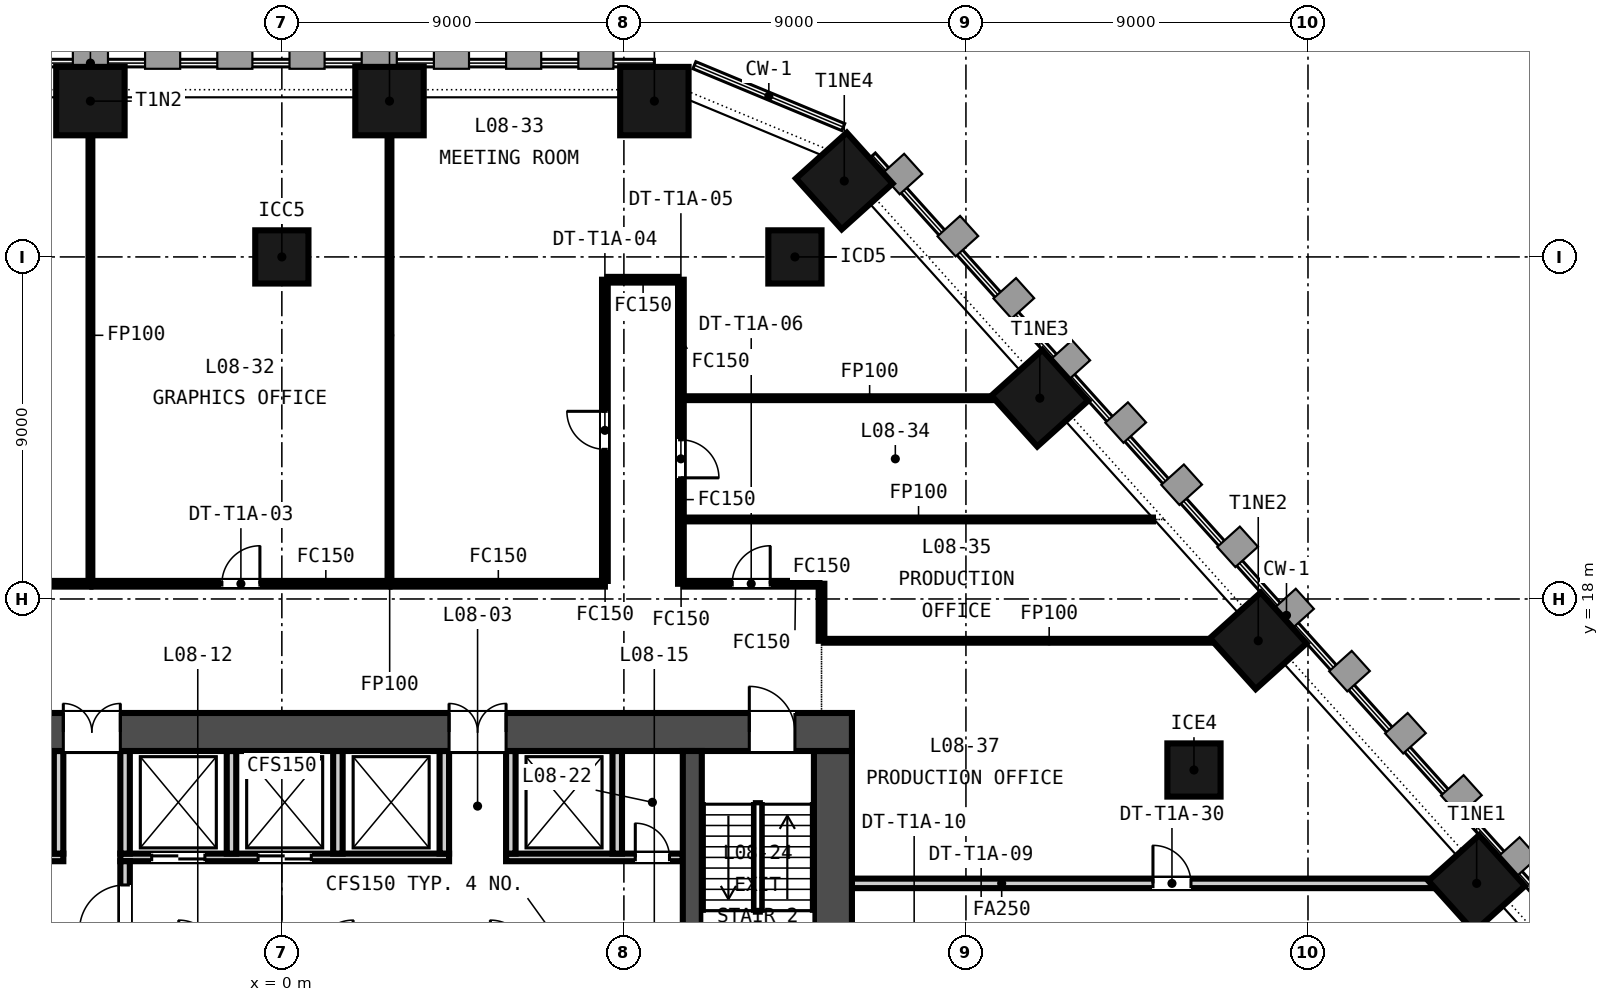
"""IFC4 building model, lengths in metres.
Left out: names, types, materials, properties, quantities, classifications, styles, units other than length and angle.
Written with IfcOpenShell. Run it as: python <this file> out.ifc"""

import sys

from ifc_helpers import new_model, si_unit, direction, frame, frame_2d, origin, origin_2d, place, context, subcontext, project, spatial, rectangle, extrude, element, fill, save


model = new_model("IFC4")
c1 = context("Model", 3, precision=1e-05, world=origin(), true_north=direction((0.0, 1.0)))
c2 = subcontext(c1, "Body", "Model", "MODEL_VIEW")
j1 = project(units=[si_unit("LENGTHUNIT", "METRE"), si_unit("PLANEANGLEUNIT", "RADIAN")], contexts=[c1])
p1 = place(None, origin())
s1 = spatial("IfcSite", under=j1, at=p1, CompositionType="ELEMENT")
p2 = place(p1, origin())
s2 = spatial("IfcBuilding", under=s1, at=p2, CompositionType="ELEMENT")
p3 = place(p2, frame((0.0, 0.0, 43.3)))
s3 = spatial("IfcBuildingStorey", under=s2, at=p3, CompositionType="ELEMENT", Elevation=43.3)
p4 = place(p3, frame((-15.0, 14.5, -0.15), z_axis=(0.0, 0.0, 1.0), x_axis=(1.0, 0.0, 0.0)))
e1 = element("IfcWall", 1, at=p4, inside=s3, PredefinedType="SOLIDWALL", context=c2, shape_type="SweptSolid", body=[
    extrude(rectangle(XDim=30.0, YDim=1.0, at=frame_2d((15.0, 0.0))), origin(), (0.0, 0.0, 1.0), 3.65),
])
p5 = place(p4, frame((9.25, 0.0, 0.15)))
e2 = element("IfcOpeningElement", 2, at=p5, cuts=e1, PredefinedType="OPENING", context=c2, shape_type="SweptSolid", body=[
    extrude(rectangle(XDim=1.5, YDim=2.1, at=frame_2d((0.75, 1.05))), frame((0.0, 0.51, 0.0), z_axis=(0.0, -1.0, 0.0), x_axis=(1.0, 0.0, 0.0)), (0.0, 0.0, 1.0), 1.02),
])
p6 = place(p4, frame((19.4, 0.0, 0.15)))
e3 = element("IfcOpeningElement", 3, at=p6, cuts=e1, PredefinedType="OPENING", context=c2, shape_type="SweptSolid", body=[
    extrude(rectangle(XDim=1.5, YDim=2.1, at=frame_2d((0.75, 1.05))), frame((0.0, 0.51, 0.0), z_axis=(0.0, -1.0, 0.0), x_axis=(1.0, 0.0, 0.0)), (0.0, 0.0, 1.0), 1.02),
])
p7 = place(p4, frame((1.5, 0.0, 0.15)))
e4 = element("IfcOpeningElement", 4, at=p7, cuts=e1, PredefinedType="OPENING", context=c2, shape_type="SweptSolid", body=[
    extrude(rectangle(XDim=1.2, YDim=2.1, at=frame_2d((0.6, 1.05))), frame((0.0, 0.51, 0.0), z_axis=(0.0, -1.0, 0.0), x_axis=(1.0, 0.0, 0.0)), (0.0, 0.0, 1.0), 1.02),
])
p8 = place(p4, frame((27.3, 0.0, 0.15)))
e5 = element("IfcOpeningElement", 5, at=p8, cuts=e1, PredefinedType="OPENING", context=c2, shape_type="SweptSolid", body=[
    extrude(rectangle(XDim=1.2, YDim=2.1, at=frame_2d((0.6, 1.05))), frame((0.0, 0.51, 0.0), z_axis=(0.0, -1.0, 0.0), x_axis=(1.0, 0.0, 0.0)), (0.0, 0.0, 1.0), 1.02),
])
p9 = place(p3, frame((14.5, 1.0, -0.15), z_axis=(0.0, 0.0, 1.0), x_axis=(0.0, 1.0, 0.0)))
e6 = element("IfcWall", 6, at=p9, inside=s3, PredefinedType="SOLIDWALL", context=c2, shape_type="SweptSolid", body=[
    extrude(rectangle(XDim=13.0, YDim=1.0, at=frame_2d((6.5, 0.0))), origin(), (0.0, 0.0, 1.0), 3.65),
])
p10 = place(p3, frame((10.8, 1.0, -0.15), z_axis=(0.0, 0.0, 1.0), x_axis=(0.0, 1.0, 0.0)))
e7 = element("IfcWall", 7, at=p10, inside=s3, PredefinedType="SOLIDWALL", context=c2, shape_type="SweptSolid", body=[
    extrude(rectangle(XDim=13.0, YDim=0.5, at=frame_2d((6.5, 0.0))), origin(), (0.0, 0.0, 1.0), 3.65),
])
for number, where, z_axis, x_axis in (
    (8, (9.802, 31.1, -0.15), (0.0, 0.0, 1.0), (-1.0, 0.0, 0.0)),
    (9, (2.832, 31.1, -0.15), (0.0, 0.0, 1.0), (-1.0, 0.0, 0.0)),
    (10, (-5.037, 31.1, -0.15), (0.0, 0.0, 1.0), (-1.0, 0.0, 0.0)),
    (11, (31.438, 10.517, -0.15), (0.0, 0.0, 1.0), (-0.669, 0.743, 0.0)),
    (12, (25.691, 16.9, -0.15), (0.0, 0.0, 1.0), (-0.669, 0.743, 0.0)),
    (13, (19.944, 23.283, -0.15), (0.0, 0.0, 1.0), (-0.669, 0.743, 0.0)),
    (14, (14.799, 28.998, -0.15), (0.0, 0.0, 1.0), (-0.669, 0.743, 0.0)),
):
    element("IfcColumn", number, at=place(p3, frame(where, z_axis=z_axis, x_axis=x_axis)), inside=s3, PredefinedType="COLUMN", context=c2, shape_type="SweptSolid", body=[
        extrude(rectangle(XDim=1.8, YDim=1.8, at=origin_2d()), origin(), (0.0, 0.0, 1.0), 3.65),
    ])
for number, where, z_axis, x_axis in (
    (15, (0.0, 27.0, -0.15), (0.0, 0.0, 1.0), (1.0, 0.0, 0.0)),
    (16, (13.5, 27.0, -0.15), (0.0, 0.0, 1.0), (1.0, 0.0, 0.0)),
    (17, (24.0, 13.5, -0.15), (0.0, 0.0, 1.0), (1.0, 0.0, 0.0)),
):
    element("IfcColumn", number, at=place(p3, frame(where, z_axis=z_axis, x_axis=x_axis)), inside=s3, PredefinedType="COLUMN", context=c2, shape_type="SweptSolid", body=[
        extrude(rectangle(XDim=1.4, YDim=1.4, at=origin_2d()), origin(), (0.0, 0.0, 1.0), 3.65),
    ])
p11 = place(p3, frame((-10.55, 11.2, 0.0), z_axis=(0.0, 0.0, 1.0), x_axis=(1.0, 0.0, 0.0)))
e18 = element("IfcWall", 18, at=p11, inside=s3, PredefinedType="PARTITIONING", context=c2, shape_type="SweptSolid", body=[
    extrude(rectangle(XDim=4.8, YDim=0.2, at=frame_2d((2.4, 0.0))), origin(), (0.0, 0.0, 1.0), 3.5),
])
p12 = place(p11, frame((0.525, 0.0, 0.0)))
e19 = element("IfcOpeningElement", 19, at=p12, cuts=e18, PredefinedType="OPENING", context=c2, shape_type="SweptSolid", body=[
    extrude(rectangle(XDim=1.1, YDim=2.1, at=frame_2d((0.55, 1.05))), frame((0.0, 0.11, 0.0), z_axis=(0.0, -1.0, 0.0), x_axis=(1.0, 0.0, 0.0)), (0.0, 0.0, 1.0), 0.22),
])
p13 = place(p11, frame((2.925, 0.0, 0.0)))
e20 = element("IfcOpeningElement", 20, at=p13, cuts=e18, PredefinedType="OPENING", context=c2, shape_type="SweptSolid", body=[
    extrude(rectangle(XDim=1.1, YDim=2.1, at=frame_2d((0.55, 1.05))), frame((0.0, 0.11, 0.0), z_axis=(0.0, -1.0, 0.0), x_axis=(1.0, 0.0, 0.0)), (0.0, 0.0, 1.0), 0.22),
])
p14 = place(p3, frame((-4.25, 11.2, 0.0), z_axis=(0.0, 0.0, 1.0), x_axis=(1.0, 0.0, 0.0)))
e21 = element("IfcWall", 21, at=p14, inside=s3, PredefinedType="PARTITIONING", context=c2, shape_type="SweptSolid", body=[
    extrude(rectangle(XDim=8.65, YDim=0.2, at=frame_2d((4.325, 0.0))), origin(), (0.0, 0.0, 1.0), 3.5),
])
p15 = place(p14, frame((0.825, 0.0, 0.0)))
e22 = element("IfcOpeningElement", 22, at=p15, cuts=e21, PredefinedType="OPENING", context=c2, shape_type="SweptSolid", body=[
    extrude(rectangle(XDim=1.4, YDim=2.1, at=frame_2d((0.7, 1.05))), frame((0.0, 0.11, 0.0), z_axis=(0.0, -1.0, 0.0), x_axis=(1.0, 0.0, 0.0)), (0.0, 0.0, 1.0), 0.22),
])
p16 = place(p14, frame((3.625, 0.0, 0.0)))
e23 = element("IfcOpeningElement", 23, at=p16, cuts=e21, PredefinedType="OPENING", context=c2, shape_type="SweptSolid", body=[
    extrude(rectangle(XDim=1.4, YDim=2.1, at=frame_2d((0.7, 1.05))), frame((0.0, 0.11, 0.0), z_axis=(0.0, -1.0, 0.0), x_axis=(1.0, 0.0, 0.0)), (0.0, 0.0, 1.0), 0.22),
])
p17 = place(p3, frame((5.9, 11.2, 0.0), z_axis=(0.0, 0.0, 1.0), x_axis=(1.0, 0.0, 0.0)))
e24 = element("IfcWall", 24, at=p17, inside=s3, PredefinedType="PARTITIONING", context=c2, shape_type="SweptSolid", body=[
    extrude(rectangle(XDim=4.65, YDim=0.2, at=frame_2d((2.325, 0.0))), origin(), (0.0, 0.0, 1.0), 3.5),
])
p18 = place(p17, frame((3.4, 0.0, 0.0)))
e25 = element("IfcOpeningElement", 25, at=p18, cuts=e24, PredefinedType="OPENING", context=c2, shape_type="SweptSolid", body=[
    extrude(rectangle(XDim=0.9, YDim=2.1, at=frame_2d((0.45, 1.05))), frame((0.0, 0.11, 0.0), z_axis=(0.0, -1.0, 0.0), x_axis=(1.0, 0.0, 0.0)), (0.0, 0.0, 1.0), 0.22),
])
p19 = place(p3, frame((-4.125, 6.15, 0.0), z_axis=(0.0, 0.0, 1.0), x_axis=(0.0, 1.0, 0.0)))
e26 = element("IfcWall", 26, at=p19, inside=s3, PredefinedType="PARTITIONING", context=c2, shape_type="SweptSolid", body=[
    extrude(rectangle(XDim=4.95, YDim=0.25, at=frame_2d((2.475, 0.0))), origin(), (0.0, 0.0, 1.0), 3.5),
])
p20 = place(p19, frame((3.125, 0.0, 0.0)))
e27 = element("IfcOpeningElement", 27, at=p20, cuts=e26, PredefinedType="OPENING", context=c2, shape_type="SweptSolid", body=[
    extrude(rectangle(XDim=1.2, YDim=2.1, at=frame_2d((0.6, 1.05))), frame((0.0, 0.135, 0.0), z_axis=(0.0, -1.0, 0.0), x_axis=(1.0, 0.0, 0.0)), (0.0, 0.0, 1.0), 0.27),
])
for number, where, z_axis, x_axis in (
    (28, (-5.875, 11.3, 0.0), (0.0, 0.0, 1.0), (0.0, 1.0, 0.0)),
    (29, (-4.125, 11.3, 0.0), (0.0, 0.0, 1.0), (0.0, 1.0, 0.0)),
    (30, (-1.325, 11.3, 0.0), (0.0, 0.0, 1.0), (0.0, 1.0, 0.0)),
    (31, (1.475, 11.3, 0.0), (0.0, 0.0, 1.0), (0.0, 1.0, 0.0)),
    (32, (4.275, 11.3, 0.0), (0.0, 0.0, 1.0), (0.0, 1.0, 0.0)),
    (33, (6.025, 11.3, 0.0), (0.0, 0.0, 1.0), (0.0, 1.0, 0.0)),
    (34, (8.825, 11.3, 0.0), (0.0, 0.0, 1.0), (0.0, 1.0, 0.0)),
):
    element("IfcWall", number, at=place(p3, frame(where, z_axis=z_axis, x_axis=x_axis)), inside=s3, PredefinedType="PARTITIONING", context=c2, shape_type="SweptSolid", body=[
        extrude(rectangle(XDim=2.7, YDim=0.25, at=frame_2d((1.35, 0.0))), origin(), (0.0, 0.0, 1.0), 3.5),
    ])
p21 = place(p3, frame((10.5, 26.4, 0.0), z_axis=(0.0, 0.0, 1.0), x_axis=(0.0, -1.0, 0.0)))
e35 = element("IfcWall", 35, at=p21, inside=s3, PredefinedType="PARTITIONING", context=c2, shape_type="SweptSolid", body=[
    extrude(rectangle(XDim=3.117, YDim=0.15, at=frame_2d((1.559, 0.0))), origin(), (0.0, 0.0, 1.0), 2.741),
])
p22 = place(p3, frame((10.5, 23.283, 0.0), z_axis=(0.0, 0.0, 1.0), x_axis=(0.0, -1.0, 0.0)))
e36 = element("IfcWall", 36, at=p22, inside=s3, PredefinedType="PARTITIONING", context=c2, shape_type="SweptSolid", body=[
    extrude(rectangle(XDim=3.191, YDim=0.15, at=frame_2d((1.595, 0.0))), origin(), (0.0, 0.0, 1.0), 2.741),
])
p23 = place(p22, frame((1.095, 0.0, 0.0)))
e37 = element("IfcOpeningElement", 37, at=p23, cuts=e36, PredefinedType="OPENING", context=c2, shape_type="SweptSolid", body=[
    extrude(rectangle(XDim=1.0, YDim=2.1, at=frame_2d((0.5, 1.05))), frame((0.0, 0.085, 0.0), z_axis=(0.0, -1.0, 0.0), x_axis=(1.0, 0.0, 0.0)), (0.0, 0.0, 1.0), 0.17),
])
p24 = place(p3, frame((10.5, 20.092, 0.0), z_axis=(0.0, 0.0, 1.0), x_axis=(0.0, -1.0, 0.0)))
e38 = element("IfcWall", 38, at=p24, inside=s3, PredefinedType="PARTITIONING", context=c2, shape_type="SweptSolid", body=[
    extrude(rectangle(XDim=1.692, YDim=0.15, at=frame_2d((0.846, 0.0))), origin(), (0.0, 0.0, 1.0), 2.741),
])
p25 = place(p3, frame((14.2, 18.4, 0.0), z_axis=(0.0, 0.0, 1.0), x_axis=(0.0, -1.0, 0.0)))
e39 = element("IfcWall", 39, at=p25, inside=s3, PredefinedType="PARTITIONING", context=c2, shape_type="SweptSolid", body=[
    extrude(rectangle(XDim=1.5, YDim=0.15, at=frame_2d((0.75, 0.0))), origin(), (0.0, 0.0, 1.0), 2.741),
])
p26 = place(p3, frame((-12.905, 18.4, 0.0), z_axis=(0.0, 0.0, 1.0), x_axis=(1.0, 0.0, 0.0)))
e40 = element("IfcWall", 40, at=p26, inside=s3, PredefinedType="PARTITIONING", context=c2, shape_type="SweptSolid", body=[
    extrude(rectangle(XDim=7.868, YDim=0.15, at=frame_2d((3.934, 0.0))), origin(), (0.0, 0.0, 1.0), 2.741),
])
p27 = place(p26, frame((3.434, 0.0, 0.0)))
e41 = element("IfcOpeningElement", 41, at=p27, cuts=e40, PredefinedType="OPENING", context=c2, shape_type="SweptSolid", body=[
    extrude(rectangle(XDim=1.0, YDim=2.1, at=frame_2d((0.5, 1.05))), frame((0.0, 0.085, 0.0), z_axis=(0.0, -1.0, 0.0), x_axis=(1.0, 0.0, 0.0)), (0.0, 0.0, 1.0), 0.17),
])
p28 = place(p3, frame((-5.037, 18.475, 0.0), z_axis=(0.0, 0.0, 1.0), x_axis=(0.0, 1.0, 0.0)))
e42 = element("IfcWall", 42, at=p28, inside=s3, PredefinedType="PARTITIONING", context=c2, shape_type="SweptSolid", body=[
    extrude(rectangle(XDim=12.925, YDim=0.1, at=frame_2d((6.462, 0.0))), origin(), (0.0, 0.0, 1.0), 2.741),
])
p29 = place(p3, frame((-4.987, 18.4, 0.0), z_axis=(0.0, 0.0, 1.0), x_axis=(1.0, 0.0, 0.0)))
e43 = element("IfcWall", 43, at=p29, inside=s3, PredefinedType="PARTITIONING", context=c2, shape_type="SweptSolid", body=[
    extrude(rectangle(XDim=7.819, YDim=0.15, at=frame_2d((3.91, 0.0))), origin(), (0.0, 0.0, 1.0), 2.741),
])
p30 = place(p29, frame((3.409, 0.0, 0.0)))
e44 = element("IfcOpeningElement", 44, at=p30, cuts=e43, PredefinedType="OPENING", context=c2, shape_type="SweptSolid", body=[
    extrude(rectangle(XDim=1.0, YDim=2.1, at=frame_2d((0.5, 1.05))), frame((0.0, 0.085, 0.0), z_axis=(0.0, -1.0, 0.0), x_axis=(1.0, 0.0, 0.0)), (0.0, 0.0, 1.0), 0.17),
])
p31 = place(p3, frame((2.832, 18.475, 0.0), z_axis=(0.0, 0.0, 1.0), x_axis=(0.0, 1.0, 0.0)))
e45 = element("IfcWall", 45, at=p31, inside=s3, PredefinedType="PARTITIONING", context=c2, shape_type="SweptSolid", body=[
    extrude(rectangle(XDim=12.925, YDim=0.1, at=frame_2d((6.462, 0.0))), origin(), (0.0, 0.0, 1.0), 2.741),
])
p32 = place(p3, frame((2.882, 18.4, 0.0), z_axis=(0.0, 0.0, 1.0), x_axis=(1.0, 0.0, 0.0)))
e46 = element("IfcWall", 46, at=p32, inside=s3, PredefinedType="PARTITIONING", context=c2, shape_type="SweptSolid", body=[
    extrude(rectangle(XDim=5.618, YDim=0.15, at=frame_2d((2.809, 0.0))), origin(), (0.0, 0.0, 1.0), 2.741),
])
p33 = place(p3, frame((8.5, 18.475, 0.0), z_axis=(0.0, 0.0, 1.0), x_axis=(0.0, 1.0, 0.0)))
e47 = element("IfcWall", 47, at=p33, inside=s3, PredefinedType="PARTITIONING", context=c2, shape_type="SweptSolid", body=[
    extrude(rectangle(XDim=7.925, YDim=0.15, at=frame_2d((3.962, 0.0))), origin(), (0.0, 0.0, 1.0), 2.741),
])
p34 = place(p33, frame((3.462, 0.0, 0.0)))
e48 = element("IfcOpeningElement", 48, at=p34, cuts=e47, PredefinedType="OPENING", context=c2, shape_type="SweptSolid", body=[
    extrude(rectangle(XDim=1.0, YDim=2.1, at=frame_2d((0.5, 1.05))), frame((0.0, 0.085, 0.0), z_axis=(0.0, -1.0, 0.0), x_axis=(1.0, 0.0, 0.0)), (0.0, 0.0, 1.0), 0.17),
])
p35 = place(p3, frame((8.575, 26.4, 0.0), z_axis=(0.0, 0.0, 1.0), x_axis=(1.0, 0.0, 0.0)))
e49 = element("IfcWall", 49, at=p35, inside=s3, PredefinedType="PARTITIONING", context=c2, shape_type="SweptSolid", body=[
    extrude(rectangle(XDim=1.85, YDim=0.15, at=frame_2d((0.925, 0.0))), origin(), (0.0, 0.0, 1.0), 2.741),
])
p36 = place(p3, frame((10.575, 23.283, 0.0), z_axis=(0.0, 0.0, 1.0), x_axis=(1.0, 0.0, 0.0)))
e50 = element("IfcWall", 50, at=p36, inside=s3, PredefinedType="PARTITIONING", context=c2, shape_type="SweptSolid", body=[
    extrude(rectangle(XDim=9.772, YDim=0.1, at=frame_2d((4.886, 0.0))), origin(), (0.0, 0.0, 1.0), 2.741),
])
p37 = place(p3, frame((10.575, 20.092, 0.0), z_axis=(0.0, 0.0, 1.0), x_axis=(1.0, 0.0, 0.0)))
e51 = element("IfcWall", 51, at=p37, inside=s3, PredefinedType="PARTITIONING", context=c2, shape_type="SweptSolid", body=[
    extrude(rectangle(XDim=12.346, YDim=0.1, at=frame_2d((6.173, 0.0))), origin(), (0.0, 0.0, 1.0), 2.741),
])
p38 = place(p3, frame((10.575, 18.4, 0.0), z_axis=(0.0, 0.0, 1.0), x_axis=(1.0, 0.0, 0.0)))
e52 = element("IfcWall", 52, at=p38, inside=s3, PredefinedType="PARTITIONING", context=c2, shape_type="SweptSolid", body=[
    extrude(rectangle(XDim=3.55, YDim=0.15, at=frame_2d((1.775, 0.0))), origin(), (0.0, 0.0, 1.0), 2.741),
])
p39 = place(p38, frame((1.275, 0.0, 0.0)))
e53 = element("IfcOpeningElement", 53, at=p39, cuts=e52, PredefinedType="OPENING", context=c2, shape_type="SweptSolid", body=[
    extrude(rectangle(XDim=1.0, YDim=2.1, at=frame_2d((0.5, 1.05))), frame((0.0, 0.085, 0.0), z_axis=(0.0, -1.0, 0.0), x_axis=(1.0, 0.0, 0.0)), (0.0, 0.0, 1.0), 0.17),
])
p40 = place(p3, frame((14.275, 16.9, 0.0), z_axis=(0.0, 0.0, 1.0), x_axis=(1.0, 0.0, 0.0)))
e54 = element("IfcWall", 54, at=p40, inside=s3, PredefinedType="PARTITIONING", context=c2, shape_type="SweptSolid", body=[
    extrude(rectangle(XDim=11.82, YDim=0.1, at=frame_2d((5.91, 0.0))), origin(), (0.0, 0.0, 1.0), 2.741),
])
p41 = place(p3, frame((15.0, 10.517, 0.0), z_axis=(0.0, 0.0, 1.0), x_axis=(1.0, 0.0, 0.0)))
e55 = element("IfcWall", 55, at=p41, inside=s3, PredefinedType="PARTITIONING", context=c2, shape_type="SweptSolid", body=[
    extrude(rectangle(XDim=16.842, YDim=0.25, at=frame_2d((8.421, 0.0))), origin(), (0.0, 0.0, 1.0), 2.741),
])
p42 = place(p41, frame((7.921, 0.0, 0.0)))
e56 = element("IfcOpeningElement", 56, at=p42, cuts=e55, PredefinedType="OPENING", context=c2, shape_type="SweptSolid", body=[
    extrude(rectangle(XDim=1.0, YDim=2.1, at=frame_2d((0.5, 1.05))), frame((0.0, 0.135, 0.0), z_axis=(0.0, -1.0, 0.0), x_axis=(1.0, 0.0, 0.0)), (0.0, 0.0, 1.0), 0.27),
])
p43 = place(p20, origin())
e57 = element("IfcDoor", 57, at=p43, inside=s3, OperationType="SINGLE_SWING_LEFT", PredefinedType="DOOR", context=c2, shape_type="SweptSolid", body=[
    extrude(rectangle(XDim=1.2, YDim=2.1, at=frame_2d((0.6, 1.05))), frame((0.0, 0.025, 0.0), z_axis=(0.0, -1.0, 0.0), x_axis=(1.0, 0.0, 0.0)), (0.0, 0.0, 1.0), 0.05),
])
fill(e27, e57)
p44 = place(p15, origin())
e58 = element("IfcDoor", 58, at=p44, inside=s3, OperationType="DOUBLE_DOOR_SLIDING", PredefinedType="DOOR", context=c2, shape_type="SweptSolid", body=[
    extrude(rectangle(XDim=1.4, YDim=2.1, at=frame_2d((0.7, 1.05))), frame((0.0, 0.025, 0.0), z_axis=(0.0, -1.0, 0.0), x_axis=(1.0, 0.0, 0.0)), (0.0, 0.0, 1.0), 0.05),
])
fill(e22, e58)
p45 = place(p16, origin())
e59 = element("IfcDoor", 59, at=p45, inside=s3, OperationType="DOUBLE_DOOR_SLIDING", PredefinedType="DOOR", context=c2, shape_type="SweptSolid", body=[
    extrude(rectangle(XDim=1.4, YDim=2.1, at=frame_2d((0.7, 1.05))), frame((0.0, 0.025, 0.0), z_axis=(0.0, -1.0, 0.0), x_axis=(1.0, 0.0, 0.0)), (0.0, 0.0, 1.0), 0.05),
])
fill(e23, e59)
p46 = place(p18, origin())
e60 = element("IfcDoor", 60, at=p46, inside=s3, OperationType="SINGLE_SWING_LEFT", PredefinedType="DOOR", context=c2, shape_type="SweptSolid", body=[
    extrude(rectangle(XDim=0.9, YDim=2.1, at=frame_2d((0.45, 1.05))), frame((0.0, 0.025, 0.0), z_axis=(0.0, -1.0, 0.0), x_axis=(1.0, 0.0, 0.0)), (0.0, 0.0, 1.0), 0.05),
])
fill(e25, e60)
p47 = place(p5, origin())
e61 = element("IfcDoor", 61, at=p47, inside=s3, OperationType="DOUBLE_DOOR_SINGLE_SWING", PredefinedType="DOOR", context=c2, shape_type="SweptSolid", body=[
    extrude(rectangle(XDim=1.5, YDim=2.1, at=frame_2d((0.75, 1.05))), frame((0.0, 0.025, 0.0), z_axis=(0.0, -1.0, 0.0), x_axis=(1.0, 0.0, 0.0)), (0.0, 0.0, 1.0), 0.05),
])
fill(e2, e61)
p48 = place(p6, origin())
e62 = element("IfcDoor", 62, at=p48, inside=s3, OperationType="DOUBLE_DOOR_SINGLE_SWING", PredefinedType="DOOR", context=c2, shape_type="SweptSolid", body=[
    extrude(rectangle(XDim=1.5, YDim=2.1, at=frame_2d((0.75, 1.05))), frame((0.0, 0.025, 0.0), z_axis=(0.0, -1.0, 0.0), x_axis=(1.0, 0.0, 0.0)), (0.0, 0.0, 1.0), 0.05),
])
fill(e3, e62)
p49 = place(p8, origin())
e63 = element("IfcDoor", 63, at=p49, inside=s3, OperationType="SINGLE_SWING_LEFT", PredefinedType="DOOR", context=c2, shape_type="SweptSolid", body=[
    extrude(rectangle(XDim=1.2, YDim=2.1, at=frame_2d((0.6, 1.05))), frame((0.0, 0.025, 0.0), z_axis=(0.0, -1.0, 0.0), x_axis=(1.0, 0.0, 0.0)), (0.0, 0.0, 1.0), 0.05),
])
fill(e5, e63)
p50 = place(p30, origin())
e64 = element("IfcDoor", 64, at=p50, inside=s3, OperationType="SINGLE_SWING_RIGHT", PredefinedType="DOOR", context=c2, shape_type="SweptSolid", body=[
    extrude(rectangle(XDim=1.0, YDim=2.1, at=frame_2d((0.5, 1.05))), frame((0.0, 0.025, 0.0), z_axis=(0.0, -1.0, 0.0), x_axis=(1.0, 0.0, 0.0)), (0.0, 0.0, 1.0), 0.05),
])
fill(e44, e64)
p51 = place(p34, origin())
e65 = element("IfcDoor", 65, at=p51, inside=s3, OperationType="SINGLE_SWING_RIGHT", PredefinedType="DOOR", context=c2, shape_type="SweptSolid", body=[
    extrude(rectangle(XDim=1.0, YDim=2.1, at=frame_2d((0.5, 1.05))), frame((0.0, 0.025, 0.0), z_axis=(0.0, -1.0, 0.0), x_axis=(1.0, 0.0, 0.0)), (0.0, 0.0, 1.0), 0.05),
])
fill(e48, e65)
p52 = place(p23, origin())
e66 = element("IfcDoor", 66, at=p52, inside=s3, OperationType="SINGLE_SWING_RIGHT", PredefinedType="DOOR", context=c2, shape_type="SweptSolid", body=[
    extrude(rectangle(XDim=1.0, YDim=2.1, at=frame_2d((0.5, 1.05))), frame((0.0, 0.025, 0.0), z_axis=(0.0, -1.0, 0.0), x_axis=(1.0, 0.0, 0.0)), (0.0, 0.0, 1.0), 0.05),
])
fill(e37, e66)
p53 = place(p39, origin())
e67 = element("IfcDoor", 67, at=p53, inside=s3, OperationType="SINGLE_SWING_RIGHT", PredefinedType="DOOR", context=c2, shape_type="SweptSolid", body=[
    extrude(rectangle(XDim=1.0, YDim=2.1, at=frame_2d((0.5, 1.05))), frame((0.0, 0.025, 0.0), z_axis=(0.0, -1.0, 0.0), x_axis=(1.0, 0.0, 0.0)), (0.0, 0.0, 1.0), 0.05),
])
fill(e53, e67)
p54 = place(p42, origin())
e68 = element("IfcDoor", 68, at=p54, inside=s3, OperationType="SINGLE_SWING_LEFT", PredefinedType="DOOR", context=c2, shape_type="SweptSolid", body=[
    extrude(rectangle(XDim=1.0, YDim=2.1, at=frame_2d((0.5, 1.05))), frame((0.0, 0.025, 0.0), z_axis=(0.0, -1.0, 0.0), x_axis=(1.0, 0.0, 0.0)), (0.0, 0.0, 1.0), 0.05),
])
fill(e56, e68)
save(model, sys.argv[1])
